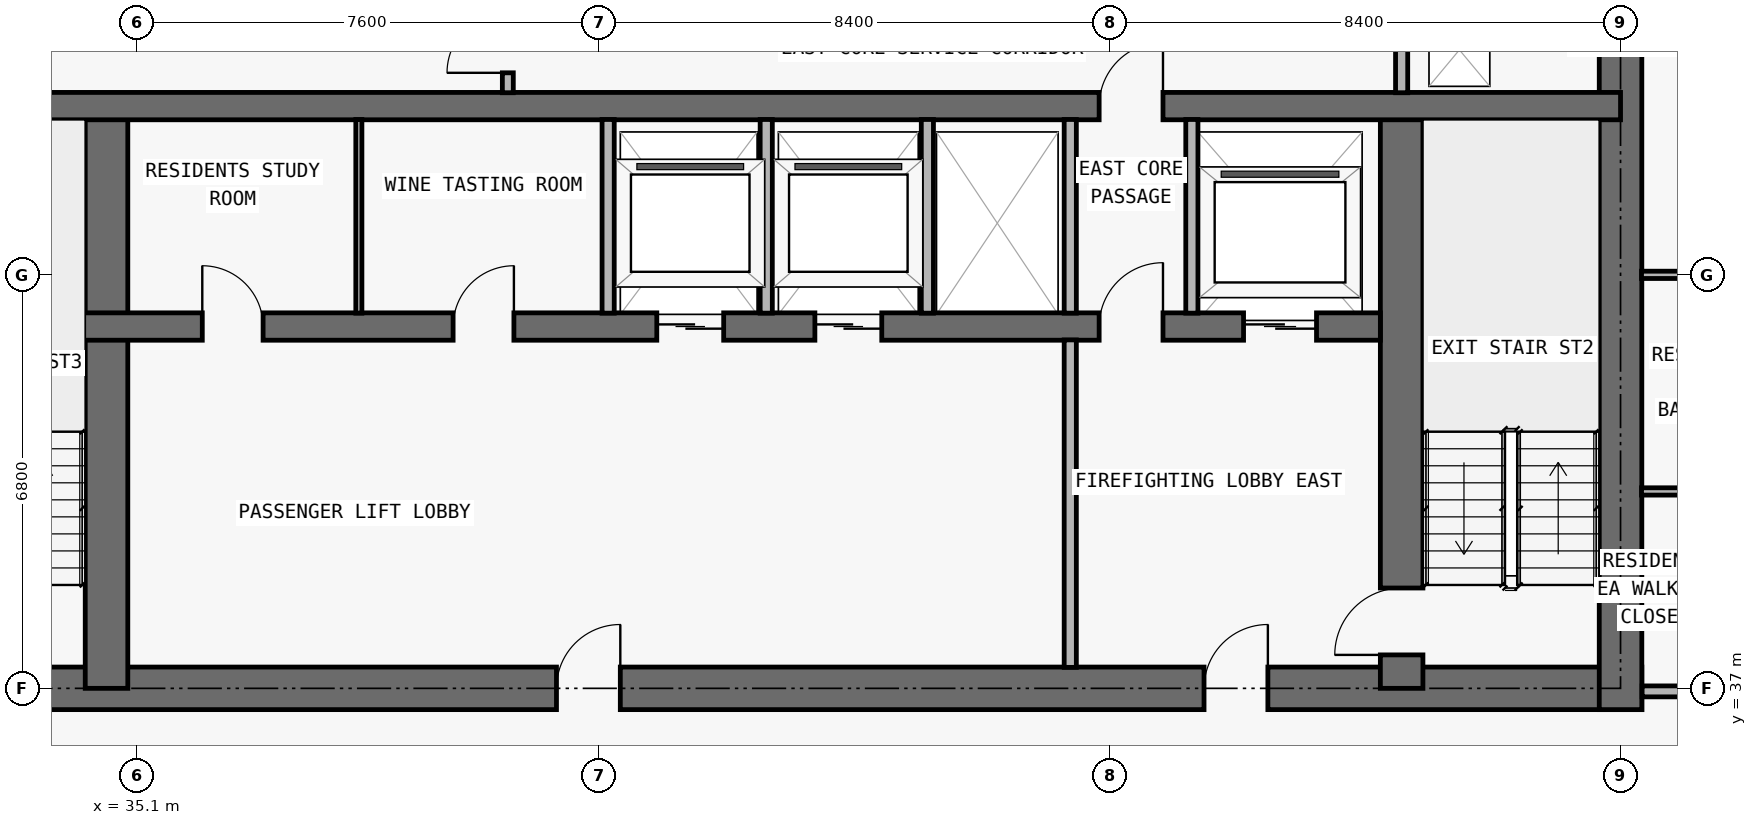
"""IFC4 building model, lengths in metres.
Left out: names, types, materials, properties, quantities, classifications, styles, units other than length and angle.
Written with IfcOpenShell. Run it as: python <this file> out.ifc"""

import sys

from ifc_helpers import new_model, si_unit, direction, frame, frame_2d, origin, place, context, subcontext, project, spatial, rectangle, extrude, element, fill, save


model = new_model("IFC4")
c1 = context("Model", 3, precision=1e-05, world=origin(), true_north=direction((0.0, 1.0)))
c2 = subcontext(c1, "Body", "Model", "MODEL_VIEW")
j1 = project(units=[si_unit("LENGTHUNIT", "METRE"), si_unit("PLANEANGLEUNIT", "RADIAN")], contexts=[c1])
p1 = place(None, origin())
s1 = spatial("IfcSite", under=j1, at=p1, CompositionType="ELEMENT")
p2 = place(p1, origin())
s2 = spatial("IfcBuilding", under=s1, at=p2, CompositionType="ELEMENT")
p3 = place(p2, frame((0.0, 0.0, 160.5)))
s3 = spatial("IfcBuildingStorey", under=s2, at=p3, CompositionType="ELEMENT", Elevation=160.5)
p4 = place(p3, frame((17.95, 37.0, 0.0), z_axis=(0.0, 0.0, 1.0), x_axis=(1.0, 0.0, 0.0)))
e1 = element("IfcWall", 1, at=p4, inside=s3, PredefinedType="SHEAR", context=c2, shape_type="SweptSolid", body=[
    extrude(rectangle(XDim=41.9, YDim=0.7, at=frame_2d((20.95, 0.0))), origin(), (0.0, 0.0, 1.0), 3.05),
])
p5 = place(p4, frame((14.35, 0.0, 0.0)))
e2 = element("IfcOpeningElement", 2, at=p5, cuts=e1, PredefinedType="OPENING", context=c2, shape_type="SweptSolid", body=[
    extrude(rectangle(XDim=1.1, YDim=2.15, at=frame_2d((0.55, 1.075))), frame((0.0, 0.36, 0.0), z_axis=(0.0, -1.0, 0.0), x_axis=(1.0, 0.0, 0.0)), (0.0, 0.0, 1.0), 0.72),
])
p6 = place(p4, frame((6.2, 0.0, 0.0)))
e3 = element("IfcOpeningElement", 3, at=p6, cuts=e1, PredefinedType="OPENING", context=c2, shape_type="SweptSolid", body=[
    extrude(rectangle(XDim=1.05, YDim=2.15, at=frame_2d((0.525, 1.075))), frame((0.0, 0.36, 0.0), z_axis=(0.0, -1.0, 0.0), x_axis=(1.0, 0.0, 0.0)), (0.0, 0.0, 1.0), 0.72),
])
p7 = place(p4, frame((34.7, 0.0, 0.0)))
e4 = element("IfcOpeningElement", 4, at=p7, cuts=e1, PredefinedType="OPENING", context=c2, shape_type="SweptSolid", body=[
    extrude(rectangle(XDim=1.05, YDim=2.15, at=frame_2d((0.525, 1.075))), frame((0.0, 0.36, 0.0), z_axis=(0.0, -1.0, 0.0), x_axis=(1.0, 0.0, 0.0)), (0.0, 0.0, 1.0), 0.72),
])
p8 = place(p4, frame((10.812, 0.0, 0.0)))
e5 = element("IfcOpeningElement", 5, at=p8, cuts=e1, PredefinedType="OPENING", context=c2, shape_type="SweptSolid", body=[
    extrude(rectangle(XDim=1.05, YDim=2.15, at=frame_2d((0.525, 1.075))), frame((0.0, 0.36, 0.0), z_axis=(0.0, -1.0, 0.0), x_axis=(1.0, 0.0, 0.0)), (0.0, 0.0, 1.0), 0.72),
])
p9 = place(p4, frame((24.05, 0.0, 0.0)))
e6 = element("IfcOpeningElement", 6, at=p9, cuts=e1, PredefinedType="OPENING", context=c2, shape_type="SweptSolid", body=[
    extrude(rectangle(XDim=1.05, YDim=2.15, at=frame_2d((0.525, 1.075))), frame((0.0, 0.36, 0.0), z_axis=(0.0, -1.0, 0.0), x_axis=(1.0, 0.0, 0.0)), (0.0, 0.0, 1.0), 0.72),
])
p10 = place(p3, frame((59.5, 36.65, 0.0), z_axis=(0.0, 0.0, 1.0), x_axis=(0.0, 1.0, 0.0)))
e7 = element("IfcWall", 7, at=p10, inside=s3, PredefinedType="SHEAR", context=c2, shape_type="SweptSolid", body=[
    extrude(rectangle(XDim=13.95, YDim=0.7, at=frame_2d((6.975, 0.0))), origin(), (0.0, 0.0, 1.0), 3.05),
])
p11 = place(p3, frame((55.9, 37.0, 0.0), z_axis=(0.0, 0.0, 1.0), x_axis=(0.0, 1.0, 0.0)))
e8 = element("IfcWall", 8, at=p11, inside=s3, PredefinedType="SHEAR", context=c2, shape_type="SweptSolid", body=[
    extrude(rectangle(XDim=9.575, YDim=0.7, at=frame_2d((4.788, 0.0))), origin(), (0.0, 0.0, 1.0), 3.05),
])
p12 = place(p11, frame((0.55, 0.0, 0.0)))
e9 = element("IfcOpeningElement", 9, at=p12, cuts=e8, PredefinedType="OPENING", context=c2, shape_type="SweptSolid", body=[
    extrude(rectangle(XDim=1.1, YDim=2.15, at=frame_2d((0.55, 1.075))), frame((0.0, 0.36, 0.0), z_axis=(0.0, -1.0, 0.0), x_axis=(1.0, 0.0, 0.0)), (0.0, 0.0, 1.0), 0.72),
])
p13 = place(p3, frame((34.6, 37.0, 0.0), z_axis=(0.0, 0.0, 1.0), x_axis=(0.0, 1.0, 0.0)))
e10 = element("IfcWall", 10, at=p13, inside=s3, PredefinedType="SHEAR", context=c2, shape_type="SweptSolid", body=[
    extrude(rectangle(XDim=9.575, YDim=0.7, at=frame_2d((4.788, 0.0))), origin(), (0.0, 0.0, 1.0), 3.05),
])
p14 = place(p3, frame((22.25, 42.95, 0.0), z_axis=(0.0, 0.0, 1.0), x_axis=(1.0, 0.0, 0.0)))
e11 = element("IfcWall", 11, at=p14, inside=s3, PredefinedType="SHEAR", context=c2, shape_type="SweptSolid", body=[
    extrude(rectangle(XDim=33.3, YDim=0.45, at=frame_2d((16.65, 0.0))), origin(), (0.0, 0.0, 1.0), 3.05),
])
p15 = place(p14, frame((1.05, 0.0, 0.0)))
e12 = element("IfcOpeningElement", 12, at=p15, cuts=e11, PredefinedType="OPENING", context=c2, shape_type="SweptSolid", body=[
    extrude(rectangle(XDim=1.2, YDim=2.2, at=frame_2d((0.6, 1.1))), frame((0.0, 0.235, 0.0), z_axis=(0.0, -1.0, 0.0), x_axis=(1.0, 0.0, 0.0)), (0.0, 0.0, 1.0), 0.47),
])
p16 = place(p14, frame((31.05, 0.0, 0.0)))
e13 = element("IfcOpeningElement", 13, at=p16, cuts=e11, PredefinedType="OPENING", context=c2, shape_type="SweptSolid", body=[
    extrude(rectangle(XDim=1.2, YDim=2.2, at=frame_2d((0.6, 1.1))), frame((0.0, 0.235, 0.0), z_axis=(0.0, -1.0, 0.0), x_axis=(1.0, 0.0, 0.0)), (0.0, 0.0, 1.0), 0.47),
])
p17 = place(p14, frame((21.4, 0.0, 0.0)))
e14 = element("IfcOpeningElement", 14, at=p17, cuts=e11, PredefinedType="OPENING", context=c2, shape_type="SweptSolid", body=[
    extrude(rectangle(XDim=1.1, YDim=2.2, at=frame_2d((0.55, 1.1))), frame((0.0, 0.235, 0.0), z_axis=(0.0, -1.0, 0.0), x_axis=(1.0, 0.0, 0.0)), (0.0, 0.0, 1.0), 0.47),
])
p18 = place(p14, frame((24.0, 0.0, 0.0)))
e15 = element("IfcOpeningElement", 15, at=p18, cuts=e11, PredefinedType="OPENING", context=c2, shape_type="SweptSolid", body=[
    extrude(rectangle(XDim=1.1, YDim=2.2, at=frame_2d((0.55, 1.1))), frame((0.0, 0.235, 0.0), z_axis=(0.0, -1.0, 0.0), x_axis=(1.0, 0.0, 0.0)), (0.0, 0.0, 1.0), 0.47),
])
p19 = place(p14, frame((3.625, 0.0, 0.0)))
e16 = element("IfcOpeningElement", 16, at=p19, cuts=e11, PredefinedType="OPENING", context=c2, shape_type="SweptSolid", body=[
    extrude(rectangle(XDim=1.05, YDim=2.15, at=frame_2d((0.525, 1.075))), frame((0.0, 0.235, 0.0), z_axis=(0.0, -1.0, 0.0), x_axis=(1.0, 0.0, 0.0)), (0.0, 0.0, 1.0), 0.47),
])
p20 = place(p14, frame((28.675, 0.0, 0.0)))
e17 = element("IfcOpeningElement", 17, at=p20, cuts=e11, PredefinedType="OPENING", context=c2, shape_type="SweptSolid", body=[
    extrude(rectangle(XDim=1.05, YDim=2.15, at=frame_2d((0.525, 1.075))), frame((0.0, 0.235, 0.0), z_axis=(0.0, -1.0, 0.0), x_axis=(1.0, 0.0, 0.0)), (0.0, 0.0, 1.0), 0.47),
])
p21 = place(p14, frame((13.925, 0.0, 0.0)))
e18 = element("IfcOpeningElement", 18, at=p21, cuts=e11, PredefinedType="OPENING", context=c2, shape_type="SweptSolid", body=[
    extrude(rectangle(XDim=1.0, YDim=2.2, at=frame_2d((0.5, 1.1))), frame((0.0, 0.235, 0.0), z_axis=(0.0, -1.0, 0.0), x_axis=(1.0, 0.0, 0.0)), (0.0, 0.0, 1.0), 0.47),
])
p22 = place(p14, frame((18.05, 0.0, 0.0)))
e19 = element("IfcOpeningElement", 19, at=p22, cuts=e11, PredefinedType="OPENING", context=c2, shape_type="SweptSolid", body=[
    extrude(rectangle(XDim=1.0, YDim=2.2, at=frame_2d((0.5, 1.1))), frame((0.0, 0.235, 0.0), z_axis=(0.0, -1.0, 0.0), x_axis=(1.0, 0.0, 0.0)), (0.0, 0.0, 1.0), 0.47),
])
p23 = place(p3, frame((18.3, 46.575, 0.0), z_axis=(0.0, 0.0, 1.0), x_axis=(1.0, 0.0, 0.0)))
e20 = element("IfcWall", 20, at=p23, inside=s3, PredefinedType="SHEAR", context=c2, shape_type="SweptSolid", body=[
    extrude(rectangle(XDim=41.2, YDim=0.45, at=frame_2d((20.6, 0.0))), origin(), (0.0, 0.0, 1.0), 3.05),
])
p24 = place(p23, frame((7.6, 0.0, 0.0)))
e21 = element("IfcOpeningElement", 21, at=p24, cuts=e20, PredefinedType="OPENING", context=c2, shape_type="SweptSolid", body=[
    extrude(rectangle(XDim=1.0, YDim=2.2, at=frame_2d((0.5, 1.1))), frame((0.0, 0.235, 0.0), z_axis=(0.0, -1.0, 0.0), x_axis=(1.0, 0.0, 0.0)), (0.0, 0.0, 1.0), 0.47),
])
p25 = place(p23, frame((32.625, 0.0, 0.0)))
e22 = element("IfcOpeningElement", 22, at=p25, cuts=e20, PredefinedType="OPENING", context=c2, shape_type="SweptSolid", body=[
    extrude(rectangle(XDim=1.05, YDim=2.15, at=frame_2d((0.525, 1.075))), frame((0.0, 0.235, 0.0), z_axis=(0.0, -1.0, 0.0), x_axis=(1.0, 0.0, 0.0)), (0.0, 0.0, 1.0), 0.47),
])
p26 = place(p3, frame((38.75, 43.17, 0.0), z_axis=(0.0, 0.0, 1.0), x_axis=(0.0, 1.0, 0.0)))
e23 = element("IfcWall", 23, at=p26, inside=s3, PredefinedType="MOVABLE", context=c2, shape_type="SweptSolid", body=[
    extrude(rectangle(XDim=3.185, YDim=0.1, at=frame_2d((1.593, 0.0))), origin(), (0.0, 0.0, 1.0), 3.05),
])
p27 = place(p3, frame((41.2, 46.795, 0.0), z_axis=(0.0, 0.0, 1.0), x_axis=(0.0, 1.0, 0.0)))
e24 = element("IfcWall", 24, at=p27, inside=s3, PredefinedType="PARTITIONING", context=c2, shape_type="SweptSolid", body=[
    extrude(rectangle(XDim=3.16, YDim=0.18, at=frame_2d((1.58, 0.0))), origin(), (0.0, 0.0, 1.0), 3.05),
])
p28 = place(p27, frame((0.327, 0.0, 0.0)))
e25 = element("IfcOpeningElement", 25, at=p28, cuts=e24, PredefinedType="OPENING", context=c2, shape_type="SweptSolid", body=[
    extrude(rectangle(XDim=1.0, YDim=2.2, at=frame_2d((0.5, 1.1))), frame((0.0, 0.1, 0.0), z_axis=(0.0, -1.0, 0.0), x_axis=(1.0, 0.0, 0.0)), (0.0, 0.0, 1.0), 0.2),
])
for number, where, z_axis, x_axis in (
    (26, (42.85, 43.17, 0.0), (0.0, 0.0, 1.0), (0.0, 1.0, 0.0)),
    (27, (45.45, 43.17, 0.0), (0.0, 0.0, 1.0), (0.0, 1.0, 0.0)),
    (28, (48.1, 43.17, 0.0), (0.0, 0.0, 1.0), (0.0, 1.0, 0.0)),
):
    element("IfcWall", number, at=place(p3, frame(where, z_axis=z_axis, x_axis=x_axis)), inside=s3, PredefinedType="PARTITIONING", context=c2, shape_type="SweptSolid", body=[
        extrude(rectangle(XDim=3.185, YDim=0.2, at=frame_2d((1.593, 0.0))), origin(), (0.0, 0.0, 1.0), 3.05),
    ])
p29 = place(p3, frame((50.45, 37.345, 0.0), z_axis=(0.0, 0.0, 1.0), x_axis=(0.0, 1.0, 0.0)))
e29 = element("IfcWall", 29, at=p29, inside=s3, PredefinedType="PARTITIONING", context=c2, shape_type="SweptSolid", body=[
    extrude(rectangle(XDim=5.385, YDim=0.2, at=frame_2d((2.692, 0.0))), origin(), (0.0, 0.0, 1.0), 3.05),
])
for number, where, z_axis, x_axis in (
    (30, (50.45, 43.17, 0.0), (0.0, 0.0, 1.0), (0.0, 1.0, 0.0)),
    (31, (52.45, 43.17, 0.0), (0.0, 0.0, 1.0), (0.0, 1.0, 0.0)),
):
    element("IfcWall", number, at=place(p3, frame(where, z_axis=z_axis, x_axis=x_axis)), inside=s3, PredefinedType="PARTITIONING", context=c2, shape_type="SweptSolid", body=[
        extrude(rectangle(XDim=3.185, YDim=0.2, at=frame_2d((1.593, 0.0))), origin(), (0.0, 0.0, 1.0), 3.05),
    ])
p30 = place(p3, frame((55.9, 46.795, 0.0), z_axis=(0.0, 0.0, 1.0), x_axis=(0.0, 1.0, 0.0)))
e32 = element("IfcWall", 32, at=p30, inside=s3, PredefinedType="PARTITIONING", context=c2, shape_type="SweptSolid", body=[
    extrude(rectangle(XDim=3.16, YDim=0.2, at=frame_2d((1.58, 0.0))), origin(), (0.0, 0.0, 1.0), 3.05),
])
p31 = place(p3, frame((59.855, 36.95, 0.0), z_axis=(0.0, 0.0, 1.0), x_axis=(1.0, 0.0, 0.0)))
e33 = element("IfcWall", 33, at=p31, inside=s3, PredefinedType="PARTITIONING", context=c2, shape_type="SweptSolid", body=[
    extrude(rectangle(XDim=7.845, YDim=0.18, at=frame_2d((3.922, 0.0))), origin(), (0.0, 0.0, 1.0), 3.05),
])
p32 = place(p31, frame((3.385, 0.0, 0.0)))
e34 = element("IfcOpeningElement", 34, at=p32, cuts=e33, PredefinedType="OPENING", context=c2, shape_type="SweptSolid", body=[
    extrude(rectangle(XDim=1.0, YDim=2.2, at=frame_2d((0.5, 1.1))), frame((0.0, 0.1, 0.0), z_axis=(0.0, -1.0, 0.0), x_axis=(1.0, 0.0, 0.0)), (0.0, 0.0, 1.0), 0.2),
])
p33 = place(p3, frame((59.845, 40.238, 0.0), z_axis=(0.0, 0.0, 1.0), x_axis=(1.0, 0.0, 0.0)))
e35 = element("IfcWall", 35, at=p33, inside=s3, PredefinedType="PARTITIONING", context=c2, shape_type="SweptSolid", body=[
    extrude(rectangle(XDim=2.355, YDim=0.12, at=frame_2d((1.177, 0.0))), origin(), (0.0, 0.0, 1.0), 3.05),
])
p34 = place(p3, frame((59.845, 43.8, 0.0), z_axis=(0.0, 0.0, 1.0), x_axis=(1.0, 0.0, 0.0)))
e36 = element("IfcWall", 36, at=p34, inside=s3, PredefinedType="PARTITIONING", context=c2, shape_type="SweptSolid", body=[
    extrude(rectangle(XDim=11.56, YDim=0.12, at=frame_2d((5.78, 0.0))), origin(), (0.0, 0.0, 1.0), 2.418),
])
p35 = place(p34, frame((3.445, 0.0, 0.0)))
e37 = element("IfcOpeningElement", 37, at=p35, cuts=e36, PredefinedType="OPENING", context=c2, shape_type="SweptSolid", body=[
    extrude(rectangle(XDim=0.9, YDim=2.15, at=frame_2d((0.45, 1.075))), frame((0.0, 0.07, 0.0), z_axis=(0.0, -1.0, 0.0), x_axis=(1.0, 0.0, 0.0)), (0.0, 0.0, 1.0), 0.14),
])
p36 = place(p34, frame((0.752, 0.0, 0.0)))
e38 = element("IfcOpeningElement", 38, at=p36, cuts=e36, PredefinedType="OPENING", context=c2, shape_type="SweptSolid", body=[
    extrude(rectangle(XDim=0.85, YDim=2.1, at=frame_2d((0.425, 1.05))), frame((0.0, 0.07, 0.0), z_axis=(0.0, -1.0, 0.0), x_axis=(1.0, 0.0, 0.0)), (0.0, 0.0, 1.0), 0.14),
])
p37 = place(p16, origin())
e39 = element("IfcDoor", 39, at=p37, inside=s3, OperationType="DOUBLE_DOOR_SLIDING", PredefinedType="DOOR", context=c2, shape_type="SweptSolid", body=[
    extrude(rectangle(XDim=1.2, YDim=2.2, at=frame_2d((0.6, 1.1))), frame((0.0, 0.025, 0.0), z_axis=(0.0, -1.0, 0.0), x_axis=(1.0, 0.0, 0.0)), (0.0, 0.0, 1.0), 0.05),
])
fill(e13, e39)
p38 = place(p17, origin())
e40 = element("IfcDoor", 40, at=p38, inside=s3, OperationType="DOUBLE_DOOR_SLIDING", PredefinedType="DOOR", context=c2, shape_type="SweptSolid", body=[
    extrude(rectangle(XDim=1.1, YDim=2.2, at=frame_2d((0.55, 1.1))), frame((0.0, 0.025, 0.0), z_axis=(0.0, -1.0, 0.0), x_axis=(1.0, 0.0, 0.0)), (0.0, 0.0, 1.0), 0.05),
])
fill(e14, e40)
p39 = place(p18, origin())
e41 = element("IfcDoor", 41, at=p39, inside=s3, OperationType="DOUBLE_DOOR_SLIDING", PredefinedType="DOOR", context=c2, shape_type="SweptSolid", body=[
    extrude(rectangle(XDim=1.1, YDim=2.2, at=frame_2d((0.55, 1.1))), frame((0.0, 0.025, 0.0), z_axis=(0.0, -1.0, 0.0), x_axis=(1.0, 0.0, 0.0)), (0.0, 0.0, 1.0), 0.05),
])
fill(e15, e41)
p40 = place(p7, origin())
e42 = element("IfcDoor", 42, at=p40, inside=s3, OperationType="SINGLE_SWING_RIGHT", PredefinedType="DOOR", context=c2, shape_type="SweptSolid", body=[
    extrude(rectangle(XDim=1.05, YDim=2.15, at=frame_2d((0.525, 1.075))), frame((0.0, 0.025, 0.0), z_axis=(0.0, -1.0, 0.0), x_axis=(1.0, 0.0, 0.0)), (0.0, 0.0, 1.0), 0.05),
])
fill(e4, e42)
p41 = place(p12, origin())
e43 = element("IfcDoor", 43, at=p41, inside=s3, OperationType="SINGLE_SWING_LEFT", PredefinedType="DOOR", context=c2, shape_type="SweptSolid", body=[
    extrude(rectangle(XDim=1.1, YDim=2.15, at=frame_2d((0.55, 1.075))), frame((0.0, 0.025, 0.0), z_axis=(0.0, -1.0, 0.0), x_axis=(1.0, 0.0, 0.0)), (0.0, 0.0, 1.0), 0.05),
])
fill(e9, e43)
p42 = place(p20, origin())
e44 = element("IfcDoor", 44, at=p42, inside=s3, OperationType="SINGLE_SWING_RIGHT", PredefinedType="DOOR", context=c2, shape_type="SweptSolid", body=[
    extrude(rectangle(XDim=1.05, YDim=2.15, at=frame_2d((0.525, 1.075))), frame((0.0, 0.025, 0.0), z_axis=(0.0, -1.0, 0.0), x_axis=(1.0, 0.0, 0.0)), (0.0, 0.0, 1.0), 0.05),
])
fill(e17, e44)
p43 = place(p9, origin())
e45 = element("IfcDoor", 45, at=p43, inside=s3, OperationType="SINGLE_SWING_RIGHT", PredefinedType="DOOR", context=c2, shape_type="SweptSolid", body=[
    extrude(rectangle(XDim=1.05, YDim=2.15, at=frame_2d((0.525, 1.075))), frame((0.0, 0.025, 0.0), z_axis=(0.0, -1.0, 0.0), x_axis=(1.0, 0.0, 0.0)), (0.0, 0.0, 1.0), 0.05),
])
fill(e6, e45)
p44 = place(p21, origin())
e46 = element("IfcDoor", 46, at=p44, inside=s3, OperationType="SINGLE_SWING_LEFT", PredefinedType="DOOR", context=c2, shape_type="SweptSolid", body=[
    extrude(rectangle(XDim=1.0, YDim=2.2, at=frame_2d((0.5, 1.1))), frame((0.0, 0.025, 0.0), z_axis=(0.0, -1.0, 0.0), x_axis=(1.0, 0.0, 0.0)), (0.0, 0.0, 1.0), 0.05),
])
fill(e18, e46)
p45 = place(p22, origin())
e47 = element("IfcDoor", 47, at=p45, inside=s3, OperationType="SINGLE_SWING_RIGHT", PredefinedType="DOOR", context=c2, shape_type="SweptSolid", body=[
    extrude(rectangle(XDim=1.0, YDim=2.2, at=frame_2d((0.5, 1.1))), frame((0.0, 0.025, 0.0), z_axis=(0.0, -1.0, 0.0), x_axis=(1.0, 0.0, 0.0)), (0.0, 0.0, 1.0), 0.05),
])
fill(e19, e47)
p46 = place(p25, origin())
e48 = element("IfcDoor", 48, at=p46, inside=s3, OperationType="SINGLE_SWING_RIGHT", PredefinedType="DOOR", context=c2, shape_type="SweptSolid", body=[
    extrude(rectangle(XDim=1.05, YDim=2.15, at=frame_2d((0.525, 1.075))), frame((0.0, 0.025, 0.0), z_axis=(0.0, -1.0, 0.0), x_axis=(1.0, 0.0, 0.0)), (0.0, 0.0, 1.0), 0.05),
])
fill(e22, e48)
p47 = place(p28, origin())
e49 = element("IfcDoor", 49, at=p47, inside=s3, OperationType="SINGLE_SWING_LEFT", PredefinedType="DOOR", context=c2, shape_type="SweptSolid", body=[
    extrude(rectangle(XDim=1.0, YDim=2.2, at=frame_2d((0.5, 1.1))), frame((0.0, 0.025, 0.0), z_axis=(0.0, -1.0, 0.0), x_axis=(1.0, 0.0, 0.0)), (0.0, 0.0, 1.0), 0.05),
])
fill(e25, e49)
save(model, sys.argv[1])
